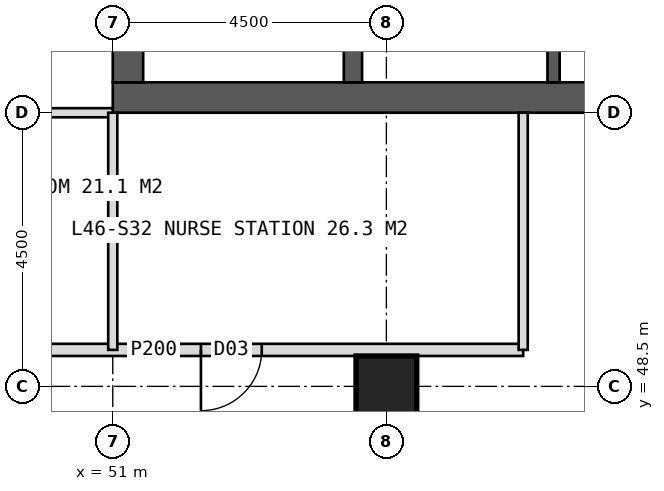
"""IFC4 building model, lengths in metres.
Left out: names, types, materials, properties, quantities, classifications, styles, units other than length and angle.
Written with IfcOpenShell. Run it as: python <this file> out.ifc"""

import sys

from ifc_helpers import new_model, si_unit, direction, frame, frame_2d, origin, origin_2d, place, context, subcontext, project, spatial, rectangle, hollow_rectangle, extrude, element, fill, save


model = new_model("IFC4")
c1 = context("Model", 3, precision=1e-05, world=origin(), true_north=direction((0.0, 1.0)))
c2 = subcontext(c1, "Body", "Model", "MODEL_VIEW")
j1 = project(units=[si_unit("LENGTHUNIT", "METRE"), si_unit("PLANEANGLEUNIT", "RADIAN")], contexts=[c1])
p1 = place(None, origin())
s1 = spatial("IfcSite", under=j1, at=p1, CompositionType="ELEMENT")
p2 = place(p1, origin())
s2 = spatial("IfcBuilding", under=s1, at=p2, CompositionType="ELEMENT")
p3 = place(p2, frame((0.0, 0.0, 193.0)))
s3 = spatial("IfcBuildingStorey", under=s2, at=p3, CompositionType="ELEMENT", Elevation=193.0)
p4 = place(p3, frame((51.0, 53.25, 0.0), z_axis=(0.0, 0.0, 1.0), x_axis=(1.0, 0.0, 0.0)))
e1 = element("IfcWall", 1, at=p4, inside=s3, PredefinedType="SHEAR", context=c2, shape_type="SweptSolid", body=[
    extrude(rectangle(XDim=18.0, YDim=0.5, at=frame_2d((9.0, 0.0))), origin(), (0.0, 0.0, 1.0), 4.0),
])
p5 = place(p4, frame((8.1, 0.0, 0.0)))
e2 = element("IfcOpeningElement", 2, at=p5, cuts=e1, PredefinedType="OPENING", context=c2, shape_type="SweptSolid", body=[
    extrude(rectangle(XDim=1.8, YDim=2.2, at=frame_2d((0.9, 1.1))), frame((0.0, 0.26, 0.0), z_axis=(0.0, -1.0, 0.0), x_axis=(1.0, 0.0, 0.0)), (0.0, 0.0, 1.0), 0.52),
])
p6 = place(p3, frame((51.25, 53.5, 0.0), z_axis=(0.0, 0.0, 1.0), x_axis=(0.0, 1.0, 0.0)))
e3 = element("IfcWall", 3, at=p6, inside=s3, PredefinedType="SHEAR", context=c2, shape_type="SweptSolid", body=[
    extrude(rectangle(XDim=17.0, YDim=0.5, at=frame_2d((8.5, 0.0))), origin(), (0.0, 0.0, 1.0), 4.0),
])
p7 = place(p6, frame((6.1, 0.0, 0.0)))
e4 = element("IfcOpeningElement", 4, at=p7, cuts=e3, PredefinedType="OPENING", context=c2, shape_type="SweptSolid", body=[
    extrude(rectangle(XDim=1.5, YDim=2.2, at=frame_2d((0.75, 1.1))), frame((0.0, 0.26, 0.0), z_axis=(0.0, -1.0, 0.0), x_axis=(1.0, 0.0, 0.0)), (0.0, 0.0, 1.0), 0.52),
])
p8 = place(p3, frame((54.95, 53.5, 0.0), z_axis=(0.0, 0.0, 1.0), x_axis=(0.0, 1.0, 0.0)))
e5 = element("IfcWall", 5, at=p8, inside=s3, PredefinedType="SHEAR", context=c2, shape_type="SweptSolid", body=[
    extrude(rectangle(XDim=17.0, YDim=0.3, at=frame_2d((8.5, 0.0))), origin(), (0.0, 0.0, 1.0), 4.0),
])
p9 = place(p3, frame((58.25, 53.5, 0.0), z_axis=(0.0, 0.0, 1.0), x_axis=(0.0, 1.0, 0.0)))
e6 = element("IfcWall", 6, at=p9, inside=s3, PredefinedType="SHEAR", context=c2, shape_type="SweptSolid", body=[
    extrude(rectangle(XDim=17.0, YDim=0.2, at=frame_2d((8.5, 0.0))), origin(), (0.0, 0.0, 1.0), 4.0),
])
p10 = place(p9, frame((0.6, 0.0, 0.0)))
e7 = element("IfcOpeningElement", 7, at=p10, cuts=e6, PredefinedType="OPENING", context=c2, shape_type="SweptSolid", body=[
    extrude(rectangle(XDim=1.0, YDim=2.1, at=frame_2d((0.5, 1.05))), frame((0.0, 0.11, 0.0), z_axis=(0.0, -1.0, 0.0), x_axis=(1.0, 0.0, 0.0)), (0.0, 0.0, 1.0), 0.22),
])
p11 = place(p9, frame((2.75, 0.0, 0.0)))
e8 = element("IfcOpeningElement", 8, at=p11, cuts=e6, PredefinedType="OPENING", context=c2, shape_type="SweptSolid", body=[
    extrude(rectangle(XDim=1.0, YDim=2.1, at=frame_2d((0.5, 1.05))), frame((0.0, 0.11, 0.0), z_axis=(0.0, -1.0, 0.0), x_axis=(1.0, 0.0, 0.0)), (0.0, 0.0, 1.0), 0.22),
])
p12 = place(p9, frame((4.824, 0.0, 0.0)))
e9 = element("IfcOpeningElement", 9, at=p12, cuts=e6, PredefinedType="OPENING", context=c2, shape_type="SweptSolid", body=[
    extrude(rectangle(XDim=1.0, YDim=2.1, at=frame_2d((0.5, 1.05))), frame((0.0, 0.11, 0.0), z_axis=(0.0, -1.0, 0.0), x_axis=(1.0, 0.0, 0.0)), (0.0, 0.0, 1.0), 0.22),
])
p13 = place(p9, frame((6.924, 0.0, 0.0)))
e10 = element("IfcOpeningElement", 10, at=p13, cuts=e6, PredefinedType="OPENING", context=c2, shape_type="SweptSolid", body=[
    extrude(rectangle(XDim=1.0, YDim=2.1, at=frame_2d((0.5, 1.05))), frame((0.0, 0.11, 0.0), z_axis=(0.0, -1.0, 0.0), x_axis=(1.0, 0.0, 0.0)), (0.0, 0.0, 1.0), 0.22),
])
p14 = place(p9, frame((10.025, 0.0, 0.0)))
e11 = element("IfcOpeningElement", 11, at=p14, cuts=e6, PredefinedType="OPENING", context=c2, shape_type="SweptSolid", body=[
    extrude(rectangle(XDim=1.4, YDim=2.2, at=frame_2d((0.7, 1.1))), frame((0.0, 0.11, 0.0), z_axis=(0.0, -1.0, 0.0), x_axis=(1.0, 0.0, 0.0)), (0.0, 0.0, 1.0), 0.22),
])
p15 = place(p9, frame((14.325, 0.0, 0.0)))
e12 = element("IfcOpeningElement", 12, at=p15, cuts=e6, PredefinedType="OPENING", context=c2, shape_type="SweptSolid", body=[
    extrude(rectangle(XDim=1.4, YDim=2.2, at=frame_2d((0.7, 1.1))), frame((0.0, 0.11, 0.0), z_axis=(0.0, -1.0, 0.0), x_axis=(1.0, 0.0, 0.0)), (0.0, 0.0, 1.0), 0.22),
])
p16 = place(p3, frame((55.5, 48.5, 0.0), z_axis=(0.0, 0.0, 1.0), x_axis=(1.0, 0.0, 0.0)))
e13 = element("IfcColumn", 13, at=p16, inside=s3, PredefinedType="COLUMN", context=c2, shape_type="SweptSolid", body=[
    extrude(hollow_rectangle(XDim=1.0, YDim=1.0, WallThickness=0.1, at=origin_2d()), origin(), (0.0, 0.0, 1.0), 4.0),
])
p17 = place(p3, frame((51.0, 53.0, 0.0), z_axis=(0.0, 0.0, 1.0), x_axis=(-1.0, 0.0, 0.0)))
e14 = element("IfcWall", 14, at=p17, inside=s3, PredefinedType="PARTITIONING", context=c2, shape_type="SweptSolid", body=[
    extrude(rectangle(XDim=5.4, YDim=0.15, at=frame_2d((2.7, 0.0))), origin(), (0.0, 0.0, 1.0), 3.75),
])
p18 = place(p3, frame((57.75, 49.1, 0.0), z_axis=(0.0, 0.0, 1.0), x_axis=(-1.0, 0.0, 0.0)))
e15 = element("IfcWall", 15, at=p18, inside=s3, PredefinedType="PARTITIONING", context=c2, shape_type="SweptSolid", body=[
    extrude(rectangle(XDim=12.15, YDim=0.2, at=frame_2d((6.075, 0.0))), origin(), (0.0, 0.0, 1.0), 3.75),
])
p19 = place(p18, frame((4.3, 0.0, 0.0)))
e16 = element("IfcOpeningElement", 16, at=p19, cuts=e15, PredefinedType="OPENING", context=c2, shape_type="SweptSolid", body=[
    extrude(rectangle(XDim=1.0, YDim=2.1, at=frame_2d((0.5, 1.05))), frame((0.0, 0.11, 0.0), z_axis=(0.0, -1.0, 0.0), x_axis=(1.0, 0.0, 0.0)), (0.0, 0.0, 1.0), 0.22),
])
p20 = place(p18, frame((8.95, 0.0, 0.0)))
e17 = element("IfcOpeningElement", 17, at=p20, cuts=e15, PredefinedType="OPENING", context=c2, shape_type="SweptSolid", body=[
    extrude(rectangle(XDim=1.0, YDim=2.1, at=frame_2d((0.5, 1.05))), frame((0.0, 0.11, 0.0), z_axis=(0.0, -1.0, 0.0), x_axis=(1.0, 0.0, 0.0)), (0.0, 0.0, 1.0), 0.22),
])
for number, where, z_axis, x_axis in (
    (18, (57.75, 53.0, 0.0), (0.0, 0.0, 1.0), (0.0, -1.0, 0.0)),
    (19, (51.0, 53.0, 0.0), (0.0, 0.0, 1.0), (0.0, -1.0, 0.0)),
):
    element("IfcWall", number, at=place(p3, frame(where, z_axis=z_axis, x_axis=x_axis)), inside=s3, PredefinedType="PARTITIONING", context=c2, shape_type="SweptSolid", body=[
        extrude(rectangle(XDim=3.9, YDim=0.15, at=frame_2d((1.95, 0.0))), origin(), (0.0, 0.0, 1.0), 3.75),
    ])
p21 = place(p19, origin())
e20 = element("IfcDoor", 20, at=p21, inside=s3, OperationType="SINGLE_SWING_RIGHT", PredefinedType="DOOR", context=c2, shape_type="SweptSolid", body=[
    extrude(rectangle(XDim=1.0, YDim=2.1, at=frame_2d((0.5, 1.05))), frame((0.0, 0.025, 0.0), z_axis=(0.0, -1.0, 0.0), x_axis=(1.0, 0.0, 0.0)), (0.0, 0.0, 1.0), 0.05),
])
fill(e16, e20)
save(model, sys.argv[1])
